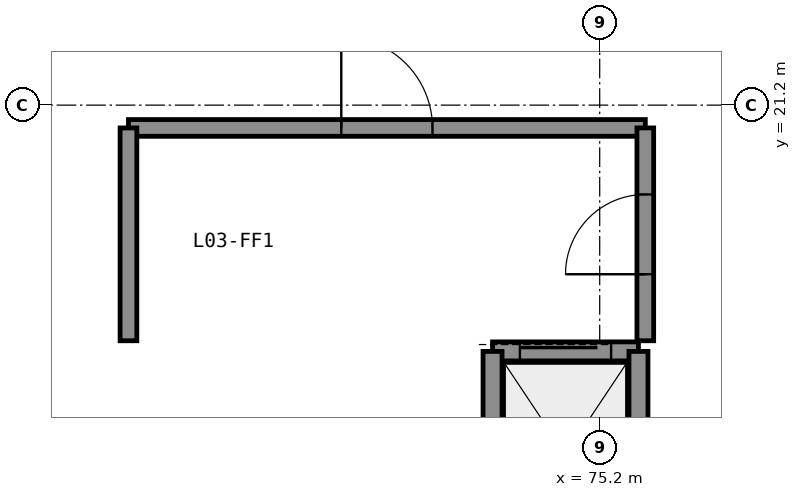
"""IFC4 building model, lengths in metres.
Left out: names, types, materials, properties, quantities, classifications, styles, units other than length and angle.
Written with IfcOpenShell. Run it as: python <this file> out.ifc"""

import sys

from ifc_helpers import new_model, si_unit, direction, frame, frame_2d, origin, place, context, subcontext, project, spatial, rectangle, extrude, element, fill, save


model = new_model("IFC4")
c1 = context("Model", 3, precision=1e-05, world=origin(), true_north=direction((0.0, 1.0)))
c2 = subcontext(c1, "Body", "Model", "MODEL_VIEW")
j1 = project(units=[si_unit("LENGTHUNIT", "METRE"), si_unit("PLANEANGLEUNIT", "RADIAN")], contexts=[c1])
p1 = place(None, origin())
s1 = spatial("IfcSite", under=j1, at=p1, CompositionType="ELEMENT")
p2 = place(p1, origin())
s2 = spatial("IfcBuilding", under=s1, at=p2, CompositionType="ELEMENT")
p3 = place(p2, frame((0.0, 0.0, 13.8)))
s3 = spatial("IfcBuildingStorey", under=s2, at=p3, CompositionType="ELEMENT", Elevation=13.8)
p4 = place(p3, frame((69.0, 20.9, 0.0), z_axis=(0.0, 0.0, 1.0), x_axis=(1.0, 0.0, 0.0)))
e1 = element("IfcWall", 1, at=p4, inside=s3, PredefinedType="SOLIDWALL", context=c2, shape_type="SweptSolid", body=[
    extrude(rectangle(XDim=6.8, YDim=0.22, at=frame_2d((3.4, 0.0))), origin(), (0.0, 0.0, 1.0), 3.95),
])
p5 = place(p4, frame((2.8, 0.0, 0.0)))
e2 = element("IfcOpeningElement", 2, at=p5, cuts=e1, PredefinedType="OPENING", context=c2, shape_type="SweptSolid", body=[
    extrude(rectangle(XDim=1.2, YDim=2.1, at=frame_2d((0.6, 1.05))), frame((0.0, 0.12, 0.0), z_axis=(0.0, -1.0, 0.0), x_axis=(1.0, 0.0, 0.0)), (0.0, 0.0, 1.0), 0.24),
])
p6 = place(p3, frame((69.0, 18.1, 0.0), z_axis=(0.0, 0.0, 1.0), x_axis=(0.0, 1.0, 0.0)))
e3 = element("IfcWall", 3, at=p6, inside=s3, PredefinedType="SOLIDWALL", context=c2, shape_type="SweptSolid", body=[
    extrude(rectangle(XDim=2.8, YDim=0.22, at=frame_2d((1.4, 0.0))), origin(), (0.0, 0.0, 1.0), 3.95),
])
p7 = place(p3, frame((75.8, 18.1, 0.0), z_axis=(0.0, 0.0, 1.0), x_axis=(0.0, 1.0, 0.0)))
e4 = element("IfcWall", 4, at=p7, inside=s3, PredefinedType="SOLIDWALL", context=c2, shape_type="SweptSolid", body=[
    extrude(rectangle(XDim=2.8, YDim=0.22, at=frame_2d((1.4, 0.0))), origin(), (0.0, 0.0, 1.0), 3.95),
])
p8 = place(p7, frame((0.875, 0.0, 0.0)))
e5 = element("IfcOpeningElement", 5, at=p8, cuts=e4, PredefinedType="OPENING", context=c2, shape_type="SweptSolid", body=[
    extrude(rectangle(XDim=1.05, YDim=2.1, at=frame_2d((0.525, 1.05))), frame((0.0, 0.12, 0.0), z_axis=(0.0, -1.0, 0.0), x_axis=(1.0, 0.0, 0.0)), (0.0, 0.0, 1.0), 0.24),
])
p9 = place(p3, frame((73.79, 17.96, 0.0), z_axis=(0.0, 0.0, 1.0), x_axis=(1.0, 0.0, 0.0)))
e6 = element("IfcWall", 6, at=p9, inside=s3, PredefinedType="SHEAR", context=c2, shape_type="SweptSolid", body=[
    extrude(rectangle(XDim=1.92, YDim=0.25, at=frame_2d((0.96, 0.0))), origin(), (0.0, 0.0, 1.0), 3.96),
])
p10 = place(p9, frame((0.36, 0.0, 0.0)))
e7 = element("IfcOpeningElement", 7, at=p10, cuts=e6, PredefinedType="OPENING", context=c2, shape_type="SweptSolid", body=[
    extrude(rectangle(XDim=1.2, YDim=2.2, at=frame_2d((0.6, 1.1))), frame((0.0, 0.135, 0.0), z_axis=(0.0, -1.0, 0.0), x_axis=(1.0, 0.0, 0.0)), (0.0, 0.0, 1.0), 0.27),
])
for number, where, z_axis, x_axis in (
    (8, (73.79, 15.24, 0.0), (0.0, 0.0, 1.0), (0.0, 1.0, 0.0)),
    (9, (75.71, 15.24, 0.0), (0.0, 0.0, 1.0), (0.0, 1.0, 0.0)),
):
    element("IfcWall", number, at=place(p3, frame(where, z_axis=z_axis, x_axis=x_axis)), inside=s3, PredefinedType="SHEAR", context=c2, shape_type="SweptSolid", body=[
        extrude(rectangle(XDim=2.72, YDim=0.25, at=frame_2d((1.36, 0.0))), origin(), (0.0, 0.0, 1.0), 3.96),
    ])
p11 = place(p5, origin())
e10 = element("IfcDoor", 10, at=p11, inside=s3, OperationType="SINGLE_SWING_LEFT", PredefinedType="DOOR", context=c2, shape_type="SweptSolid", body=[
    extrude(rectangle(XDim=1.2, YDim=2.1, at=frame_2d((0.6, 1.05))), frame((0.0, 0.025, 0.0), z_axis=(0.0, -1.0, 0.0), x_axis=(1.0, 0.0, 0.0)), (0.0, 0.0, 1.0), 0.05),
])
fill(e2, e10)
p12 = place(p8, origin())
e11 = element("IfcDoor", 11, at=p12, inside=s3, OperationType="SINGLE_SWING_LEFT", PredefinedType="DOOR", context=c2, shape_type="SweptSolid", body=[
    extrude(rectangle(XDim=1.05, YDim=2.1, at=frame_2d((0.525, 1.05))), frame((0.0, 0.025, 0.0), z_axis=(0.0, -1.0, 0.0), x_axis=(1.0, 0.0, 0.0)), (0.0, 0.0, 1.0), 0.05),
])
fill(e5, e11)
p13 = place(p10, origin())
e12 = element("IfcDoor", 12, at=p13, inside=s3, OperationType="SLIDING_TO_LEFT", PredefinedType="DOOR", context=c2, shape_type="SweptSolid", body=[
    extrude(rectangle(XDim=1.2, YDim=2.2, at=frame_2d((0.6, 1.1))), frame((0.0, 0.025, 0.0), z_axis=(0.0, -1.0, 0.0), x_axis=(1.0, 0.0, 0.0)), (0.0, 0.0, 1.0), 0.05),
])
fill(e7, e12)
save(model, sys.argv[1])
